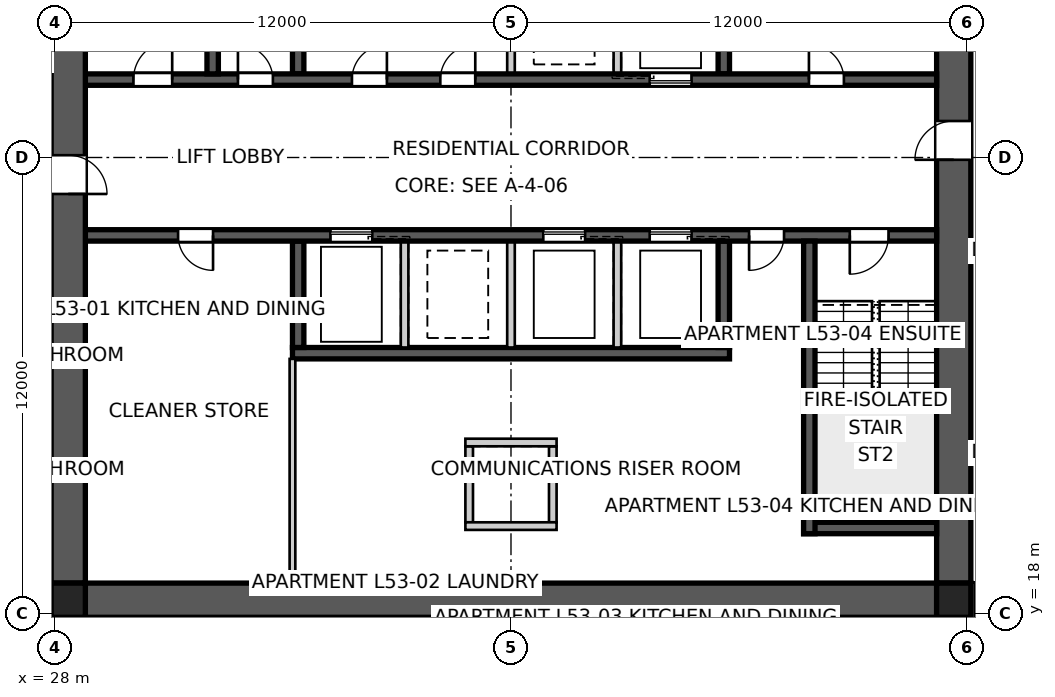
"""IFC4 building model, lengths in metres.
Left out: names, types, materials, properties, quantities, classifications, styles, units other than length and angle.
Written with IfcOpenShell. Run it as: python <this file> out.ifc"""

import sys

from ifc_helpers import new_model, si_unit, direction, frame, frame_2d, origin, origin_2d, place, context, subcontext, project, spatial, polyline, rectangle, outline, extrude, element, fill, save


model = new_model("IFC4")
c1 = context("Model", 3, precision=1e-05, world=origin(), true_north=direction((0.0, 1.0)))
c2 = subcontext(c1, "Body", "Model", "MODEL_VIEW")
j1 = project(units=[si_unit("LENGTHUNIT", "METRE"), si_unit("PLANEANGLEUNIT", "RADIAN")], contexts=[c1])
p1 = place(None, origin())
s1 = spatial("IfcSite", under=j1, at=p1, CompositionType="ELEMENT")
p2 = place(p1, origin())
s2 = spatial("IfcBuilding", under=s1, at=p2, CompositionType="ELEMENT")
p3 = place(p2, frame((0.0, 0.0, 193.0)))
s3 = spatial("IfcBuildingStorey", under=s2, at=p3, CompositionType="ELEMENT", Elevation=193.0)
p4 = place(p3, frame((51.2, 18.35, 0.0), z_axis=(0.0, 0.0, 1.0), x_axis=(-1.0, 0.0, 0.0)))
e1 = element("IfcWall", 1, at=p4, inside=s3, PredefinedType="SHEAR", context=c2, shape_type="SweptSolid", body=[
    extrude(outline(polyline([(0.0, -0.45), (22.4, -0.45), (22.4, -0.025), (22.85, -0.025), (22.85, 0.025), (22.4, 0.025), (22.4, 0.45), (0.0, 0.45), (0.0, 0.025), (-0.45, 0.025), (-0.45, -0.025), (0.0, -0.025), (0.0, -0.45)])), origin(), (0.0, 0.0, 1.0), 3.4),
])
p5 = place(p3, frame((51.65, 18.8, 0.0), z_axis=(0.0, 0.0, 1.0), x_axis=(0.0, 1.0, 0.0)))
e2 = element("IfcWall", 2, at=p5, inside=s3, PredefinedType="SHEAR", context=c2, shape_type="SweptSolid", body=[
    extrude(outline(polyline([(0.0, -0.45), (22.4, -0.45), (22.4, -0.025), (22.85, -0.025), (22.85, 0.025), (22.4, 0.025), (22.4, 0.45), (0.0, 0.45), (0.0, 0.025), (-0.45, 0.025), (-0.45, -0.025), (0.0, -0.025), (0.0, -0.45)])), origin(), (0.0, 0.0, 1.0), 3.4),
])
p6 = place(p5, frame((11.14, 0.0, 0.0)))
e3 = element("IfcOpeningElement", 3, at=p6, cuts=e2, PredefinedType="OPENING", context=c2, shape_type="SweptSolid", body=[
    extrude(rectangle(XDim=1.02, YDim=2.4, at=frame_2d((0.51, 1.2))), frame((0.0, 0.46, 0.0), z_axis=(0.0, -1.0, 0.0), x_axis=(1.0, 0.0, 0.0)), (0.0, 0.0, 1.0), 0.92),
])
p7 = place(p3, frame((28.35, 41.2, 0.0), z_axis=(0.0, 0.0, 1.0), x_axis=(0.0, -1.0, 0.0)))
e4 = element("IfcWall", 4, at=p7, inside=s3, PredefinedType="SHEAR", context=c2, shape_type="SweptSolid", body=[
    extrude(outline(polyline([(0.0, -0.45), (22.4, -0.45), (22.4, -0.025), (22.85, -0.025), (22.85, 0.025), (22.4, 0.025), (22.4, 0.45), (0.0, 0.45), (0.0, 0.025), (-0.45, 0.025), (-0.45, -0.025), (0.0, -0.025), (0.0, -0.45)])), origin(), (0.0, 0.0, 1.0), 3.4),
])
p8 = place(p7, frame((11.14, 0.0, 0.0)))
e5 = element("IfcOpeningElement", 5, at=p8, cuts=e4, PredefinedType="OPENING", context=c2, shape_type="SweptSolid", body=[
    extrude(rectangle(XDim=1.02, YDim=2.4, at=frame_2d((0.51, 1.2))), frame((0.0, 0.46, 0.0), z_axis=(0.0, -1.0, 0.0), x_axis=(1.0, 0.0, 0.0)), (0.0, 0.0, 1.0), 0.92),
])
p9 = place(p3, frame((28.8, 32.05, 0.0), z_axis=(0.0, 0.0, 1.0), x_axis=(1.0, 0.0, 0.0)))
e6 = element("IfcWall", 6, at=p9, inside=s3, PredefinedType="SHEAR", context=c2, shape_type="SweptSolid", body=[
    extrude(rectangle(XDim=22.4, YDim=0.3, at=frame_2d((11.2, 0.0))), origin(), (0.0, 0.0, 1.0), 3.4),
])
p10 = place(p9, frame((19.04, 0.0, 0.0)))
e7 = element("IfcOpeningElement", 7, at=p10, cuts=e6, PredefinedType="OPENING", context=c2, shape_type="SweptSolid", body=[
    extrude(rectangle(XDim=0.92, YDim=2.1, at=frame_2d((0.46, 1.05))), frame((0.0, 0.16, 0.0), z_axis=(0.0, -1.0, 0.0), x_axis=(1.0, 0.0, 0.0)), (0.0, 0.0, 1.0), 0.32),
])
p11 = place(p9, frame((1.265, 0.0, 0.0)))
e8 = element("IfcOpeningElement", 8, at=p11, cuts=e6, PredefinedType="OPENING", context=c2, shape_type="SweptSolid", body=[
    extrude(rectangle(XDim=1.02, YDim=2.1, at=frame_2d((0.51, 1.05))), frame((0.0, 0.16, 0.0), z_axis=(0.0, -1.0, 0.0), x_axis=(1.0, 0.0, 0.0)), (0.0, 0.0, 1.0), 0.32),
])
p12 = place(p9, frame((4.015, 0.0, 0.0)))
e9 = element("IfcOpeningElement", 9, at=p12, cuts=e6, PredefinedType="OPENING", context=c2, shape_type="SweptSolid", body=[
    extrude(rectangle(XDim=0.92, YDim=2.1, at=frame_2d((0.46, 1.05))), frame((0.0, 0.16, 0.0), z_axis=(0.0, -1.0, 0.0), x_axis=(1.0, 0.0, 0.0)), (0.0, 0.0, 1.0), 0.32),
])
p13 = place(p9, frame((7.015, 0.0, 0.0)))
e10 = element("IfcOpeningElement", 10, at=p13, cuts=e6, PredefinedType="OPENING", context=c2, shape_type="SweptSolid", body=[
    extrude(rectangle(XDim=0.92, YDim=2.1, at=frame_2d((0.46, 1.05))), frame((0.0, 0.16, 0.0), z_axis=(0.0, -1.0, 0.0), x_axis=(1.0, 0.0, 0.0)), (0.0, 0.0, 1.0), 0.32),
])
p14 = place(p9, frame((9.34, 0.0, 0.0)))
e11 = element("IfcOpeningElement", 11, at=p14, cuts=e6, PredefinedType="OPENING", context=c2, shape_type="SweptSolid", body=[
    extrude(rectangle(XDim=0.92, YDim=2.1, at=frame_2d((0.46, 1.05))), frame((0.0, 0.16, 0.0), z_axis=(0.0, -1.0, 0.0), x_axis=(1.0, 0.0, 0.0)), (0.0, 0.0, 1.0), 0.32),
])
p15 = place(p9, frame((14.85, 0.0, 0.0)))
e12 = element("IfcOpeningElement", 12, at=p15, cuts=e6, PredefinedType="OPENING", context=c2, shape_type="SweptSolid", body=[
    extrude(rectangle(XDim=1.1, YDim=2.1, at=frame_2d((0.55, 1.05))), frame((0.0, 0.16, 0.0), z_axis=(0.0, -1.0, 0.0), x_axis=(1.0, 0.0, 0.0)), (0.0, 0.0, 1.0), 0.32),
])
p16 = place(p3, frame((51.2, 27.95, 0.0), z_axis=(0.0, 0.0, 1.0), x_axis=(-1.0, 0.0, 0.0)))
e13 = element("IfcWall", 13, at=p16, inside=s3, PredefinedType="SHEAR", context=c2, shape_type="SweptSolid", body=[
    extrude(rectangle(XDim=22.4, YDim=0.3, at=frame_2d((11.2, 0.0))), origin(), (0.0, 0.0, 1.0), 3.4),
])
p17 = place(p16, frame((19.04, 0.0, 0.0)))
e14 = element("IfcOpeningElement", 14, at=p17, cuts=e13, PredefinedType="OPENING", context=c2, shape_type="SweptSolid", body=[
    extrude(rectangle(XDim=0.92, YDim=2.1, at=frame_2d((0.46, 1.05))), frame((0.0, 0.16, 0.0), z_axis=(0.0, -1.0, 0.0), x_axis=(1.0, 0.0, 0.0)), (0.0, 0.0, 1.0), 0.32),
])
p18 = place(p16, frame((1.265, 0.0, 0.0)))
e15 = element("IfcOpeningElement", 15, at=p18, cuts=e13, PredefinedType="OPENING", context=c2, shape_type="SweptSolid", body=[
    extrude(rectangle(XDim=1.02, YDim=2.1, at=frame_2d((0.51, 1.05))), frame((0.0, 0.16, 0.0), z_axis=(0.0, -1.0, 0.0), x_axis=(1.0, 0.0, 0.0)), (0.0, 0.0, 1.0), 0.32),
])
p19 = place(p16, frame((4.015, 0.0, 0.0)))
e16 = element("IfcOpeningElement", 16, at=p19, cuts=e13, PredefinedType="OPENING", context=c2, shape_type="SweptSolid", body=[
    extrude(rectangle(XDim=0.92, YDim=2.1, at=frame_2d((0.46, 1.05))), frame((0.0, 0.16, 0.0), z_axis=(0.0, -1.0, 0.0), x_axis=(1.0, 0.0, 0.0)), (0.0, 0.0, 1.0), 0.32),
])
p20 = place(p16, frame((6.45, 0.0, 0.0)))
e17 = element("IfcOpeningElement", 17, at=p20, cuts=e13, PredefinedType="OPENING", context=c2, shape_type="SweptSolid", body=[
    extrude(rectangle(XDim=1.1, YDim=2.1, at=frame_2d((0.55, 1.05))), frame((0.0, 0.16, 0.0), z_axis=(0.0, -1.0, 0.0), x_axis=(1.0, 0.0, 0.0)), (0.0, 0.0, 1.0), 0.32),
])
p21 = place(p16, frame((9.25, 0.0, 0.0)))
e18 = element("IfcOpeningElement", 18, at=p21, cuts=e13, PredefinedType="OPENING", context=c2, shape_type="SweptSolid", body=[
    extrude(rectangle(XDim=1.1, YDim=2.1, at=frame_2d((0.55, 1.05))), frame((0.0, 0.16, 0.0), z_axis=(0.0, -1.0, 0.0), x_axis=(1.0, 0.0, 0.0)), (0.0, 0.0, 1.0), 0.32),
])
p22 = place(p16, frame((14.85, 0.0, 0.0)))
e19 = element("IfcOpeningElement", 19, at=p22, cuts=e13, PredefinedType="OPENING", context=c2, shape_type="SweptSolid", body=[
    extrude(rectangle(XDim=1.1, YDim=2.1, at=frame_2d((0.55, 1.05))), frame((0.0, 0.16, 0.0), z_axis=(0.0, -1.0, 0.0), x_axis=(1.0, 0.0, 0.0)), (0.0, 0.0, 1.0), 0.32),
])
p23 = place(p3, frame((45.75, 24.85, 0.0), z_axis=(0.0, 0.0, 1.0), x_axis=(-1.0, 0.0, 0.0)))
e20 = element("IfcWall", 20, at=p23, inside=s3, PredefinedType="SHEAR", context=c2, shape_type="SweptSolid", body=[
    extrude(rectangle(XDim=11.5, YDim=0.3, at=frame_2d((5.75, 0.0))), origin(), (0.0, 0.0, 1.0), 3.4),
])
for number, where, z_axis, x_axis in (
    (21, (34.4, 32.2, 0.0), (0.0, 0.0, 1.0), (0.0, 1.0, 0.0)),
    (22, (45.6, 27.8, 0.0), (0.0, 0.0, 1.0), (0.0, -1.0, 0.0)),
):
    element("IfcWall", number, at=place(p3, frame(where, z_axis=z_axis, x_axis=x_axis)), inside=s3, PredefinedType="SHEAR", context=c2, shape_type="SweptSolid", body=[
        extrude(rectangle(XDim=2.8, YDim=0.3, at=frame_2d((1.4, 0.0))), origin(), (0.0, 0.0, 1.0), 3.4),
    ])
for number, where, z_axis, x_axis in (
    (23, (42.8, 27.8, 0.0), (0.0, 0.0, 1.0), (0.0, -1.0, 0.0)),
    (24, (40.0, 32.2, 0.0), (0.0, 0.0, 1.0), (0.0, 1.0, 0.0)),
    (25, (40.0, 27.8, 0.0), (0.0, 0.0, 1.0), (0.0, -1.0, 0.0)),
    (26, (42.8, 32.2, 0.0), (0.0, 0.0, 1.0), (0.0, 1.0, 0.0)),
    (27, (37.2, 27.8, 0.0), (0.0, 0.0, 1.0), (0.0, -1.0, 0.0)),
):
    element("IfcWall", number, at=place(p3, frame(where, z_axis=z_axis, x_axis=x_axis)), inside=s3, PredefinedType="SOLIDWALL", context=c2, shape_type="SweptSolid", body=[
        extrude(rectangle(XDim=2.8, YDim=0.2, at=frame_2d((1.4, 0.0))), origin(), (0.0, 0.0, 1.0), 3.4),
    ])
for number, where, z_axis, x_axis in (
    (28, (45.6, 32.2, 0.0), (0.0, 0.0, 1.0), (0.0, 1.0, 0.0)),
    (29, (34.4, 27.8, 0.0), (0.0, 0.0, 1.0), (0.0, -1.0, 0.0)),
):
    element("IfcWall", number, at=place(p3, frame(where, z_axis=z_axis, x_axis=x_axis)), inside=s3, PredefinedType="SHEAR", context=c2, shape_type="SweptSolid", body=[
        extrude(rectangle(XDim=2.8, YDim=0.3, at=frame_2d((1.4, 0.0))), origin(), (0.0, 0.0, 1.0), 3.4),
    ])
for number, where, z_axis, x_axis in (
    (30, (32.15, 32.2, 0.0), (0.0, 0.0, 1.0), (0.0, 1.0, 0.0)),
    (31, (47.85, 27.8, 0.0), (0.0, 0.0, 1.0), (0.0, -1.0, 0.0)),
):
    element("IfcWall", number, at=place(p3, frame(where, z_axis=z_axis, x_axis=x_axis)), inside=s3, PredefinedType="SHEAR", context=c2, shape_type="SweptSolid", body=[
        extrude(rectangle(XDim=7.7, YDim=0.3, at=frame_2d((3.85, 0.0))), origin(), (0.0, 0.0, 1.0), 3.4),
    ])
p24 = place(p3, frame((51.2, 20.25, 0.0), z_axis=(0.0, 0.0, 1.0), x_axis=(-1.0, 0.0, 0.0)))
e32 = element("IfcWall", 32, at=p24, inside=s3, PredefinedType="SHEAR", context=c2, shape_type="SweptSolid", body=[
    extrude(rectangle(XDim=3.5, YDim=0.3, at=frame_2d((1.75, 0.0))), origin(), (0.0, 0.0, 1.0), 3.4),
])
for number, where, z_axis, x_axis in (
    (33, (38.9, 22.4, 0.0), (0.0, 0.0, 1.0), (0.0, -1.0, 0.0)),
    (34, (41.1, 22.4, 0.0), (0.0, 0.0, 1.0), (0.0, -1.0, 0.0)),
):
    element("IfcWall", number, at=place(p3, frame(where, z_axis=z_axis, x_axis=x_axis)), inside=s3, PredefinedType="SOLIDWALL", context=c2, shape_type="SweptSolid", body=[
        extrude(rectangle(XDim=2.0, YDim=0.2, at=frame_2d((1.0, 0.0))), origin(), (0.0, 0.0, 1.0), 3.4),
    ])
for number, where, z_axis, x_axis in (
    (35, (38.8, 22.5, 0.0), (0.0, 0.0, 1.0), (1.0, 0.0, 0.0)),
    (36, (38.8, 20.3, 0.0), (0.0, 0.0, 1.0), (1.0, 0.0, 0.0)),
):
    element("IfcWall", number, at=place(p3, frame(where, z_axis=z_axis, x_axis=x_axis)), inside=s3, PredefinedType="SOLIDWALL", context=c2, shape_type="SweptSolid", body=[
        extrude(rectangle(XDim=2.4, YDim=0.2, at=frame_2d((1.2, 0.0))), origin(), (0.0, 0.0, 1.0), 3.4),
    ])
for number, where, z_axis, x_axis in (
    (37, (28.35, 18.35, 0.0), (0.0, 0.0, 1.0), (1.0, 0.0, 0.0)),
    (38, (51.65, 18.35, 0.0), (0.0, 0.0, 1.0), (1.0, 0.0, 0.0)),
):
    element("IfcColumn", number, at=place(p3, frame(where, z_axis=z_axis, x_axis=x_axis)), inside=s3, PredefinedType="COLUMN", context=c2, shape_type="SweptSolid", body=[
        extrude(rectangle(XDim=0.9, YDim=0.9, at=origin_2d()), origin(), (0.0, 0.0, 1.0), 3.4),
    ])
p25 = place(p3, frame((34.25, 18.8, 0.0), z_axis=(0.0, 0.0, 1.0), x_axis=(0.0, 1.0, 0.0)))
e39 = element("IfcWall", 39, at=p25, inside=s3, PredefinedType="SOLIDWALL", context=c2, shape_type="SweptSolid", body=[
    extrude(rectangle(XDim=5.9, YDim=0.15, at=frame_2d((2.95, 0.0))), origin(), (0.0, 0.0, 1.0), 3.25),
])
p26 = place(p3, frame((27.9, 17.95, 0.0), z_axis=(0.0, 0.0, 1.0), x_axis=(0.0, -1.0, 0.0)))
e40 = element("IfcWall", 40, at=p26, inside=s3, PredefinedType="PARTITIONING", context=c2, shape_type="SweptSolid", body=[
    extrude(rectangle(XDim=2.3, YDim=0.2, at=frame_2d((1.15, 0.0))), origin(), (0.0, 0.0, 1.0), 3.25),
])
p27 = place(p3, frame((52.1, 15.65, 0.0), z_axis=(0.0, 0.0, 1.0), x_axis=(0.0, 1.0, 0.0)))
e41 = element("IfcWall", 41, at=p27, inside=s3, PredefinedType="PARTITIONING", context=c2, shape_type="SweptSolid", body=[
    extrude(rectangle(XDim=3.17, YDim=0.2, at=frame_2d((1.585, 0.0))), origin(), (0.0, 0.0, 1.0), 3.25),
])
p28 = place(p10, origin())
e42 = element("IfcDoor", 42, at=p28, inside=s3, OperationType="SINGLE_SWING_LEFT", PredefinedType="DOOR", context=c2, shape_type="SweptSolid", body=[
    extrude(rectangle(XDim=0.92, YDim=2.1, at=frame_2d((0.46, 1.05))), frame((0.0, 0.025, 0.0), z_axis=(0.0, -1.0, 0.0), x_axis=(1.0, 0.0, 0.0)), (0.0, 0.0, 1.0), 0.05),
])
fill(e7, e42)
p29 = place(p17, origin())
e43 = element("IfcDoor", 43, at=p29, inside=s3, OperationType="SINGLE_SWING_LEFT", PredefinedType="DOOR", context=c2, shape_type="SweptSolid", body=[
    extrude(rectangle(XDim=0.92, YDim=2.1, at=frame_2d((0.46, 1.05))), frame((0.0, 0.025, 0.0), z_axis=(0.0, -1.0, 0.0), x_axis=(1.0, 0.0, 0.0)), (0.0, 0.0, 1.0), 0.05),
])
fill(e14, e43)
p30 = place(p18, origin())
e44 = element("IfcDoor", 44, at=p30, inside=s3, OperationType="SINGLE_SWING_RIGHT", PredefinedType="DOOR", context=c2, shape_type="SweptSolid", body=[
    extrude(rectangle(XDim=1.02, YDim=2.1, at=frame_2d((0.51, 1.05))), frame((0.0, 0.025, 0.0), z_axis=(0.0, -1.0, 0.0), x_axis=(1.0, 0.0, 0.0)), (0.0, 0.0, 1.0), 0.05),
])
fill(e15, e44)
p31 = place(p11, origin())
e45 = element("IfcDoor", 45, at=p31, inside=s3, OperationType="SINGLE_SWING_RIGHT", PredefinedType="DOOR", context=c2, shape_type="SweptSolid", body=[
    extrude(rectangle(XDim=1.02, YDim=2.1, at=frame_2d((0.51, 1.05))), frame((0.0, 0.025, 0.0), z_axis=(0.0, -1.0, 0.0), x_axis=(1.0, 0.0, 0.0)), (0.0, 0.0, 1.0), 0.05),
])
fill(e8, e45)
p32 = place(p12, origin())
e46 = element("IfcDoor", 46, at=p32, inside=s3, OperationType="SINGLE_SWING_LEFT", PredefinedType="DOOR", context=c2, shape_type="SweptSolid", body=[
    extrude(rectangle(XDim=0.92, YDim=2.1, at=frame_2d((0.46, 1.05))), frame((0.0, 0.025, 0.0), z_axis=(0.0, -1.0, 0.0), x_axis=(1.0, 0.0, 0.0)), (0.0, 0.0, 1.0), 0.05),
])
fill(e9, e46)
p33 = place(p19, origin())
e47 = element("IfcDoor", 47, at=p33, inside=s3, OperationType="SINGLE_SWING_RIGHT", PredefinedType="DOOR", context=c2, shape_type="SweptSolid", body=[
    extrude(rectangle(XDim=0.92, YDim=2.1, at=frame_2d((0.46, 1.05))), frame((0.0, 0.025, 0.0), z_axis=(0.0, -1.0, 0.0), x_axis=(1.0, 0.0, 0.0)), (0.0, 0.0, 1.0), 0.05),
])
fill(e16, e47)
p34 = place(p13, origin())
e48 = element("IfcDoor", 48, at=p34, inside=s3, OperationType="SINGLE_SWING_RIGHT", PredefinedType="DOOR", context=c2, shape_type="SweptSolid", body=[
    extrude(rectangle(XDim=0.92, YDim=2.1, at=frame_2d((0.46, 1.05))), frame((0.0, 0.025, 0.0), z_axis=(0.0, -1.0, 0.0), x_axis=(1.0, 0.0, 0.0)), (0.0, 0.0, 1.0), 0.05),
])
fill(e10, e48)
p35 = place(p14, origin())
e49 = element("IfcDoor", 49, at=p35, inside=s3, OperationType="SINGLE_SWING_RIGHT", PredefinedType="DOOR", context=c2, shape_type="SweptSolid", body=[
    extrude(rectangle(XDim=0.92, YDim=2.1, at=frame_2d((0.46, 1.05))), frame((0.0, 0.025, 0.0), z_axis=(0.0, -1.0, 0.0), x_axis=(1.0, 0.0, 0.0)), (0.0, 0.0, 1.0), 0.05),
])
fill(e11, e49)
p36 = place(p6, origin())
e50 = element("IfcDoor", 50, at=p36, inside=s3, OperationType="SINGLE_SWING_LEFT", PredefinedType="DOOR", context=c2, shape_type="SweptSolid", body=[
    extrude(rectangle(XDim=1.02, YDim=2.4, at=frame_2d((0.51, 1.2))), frame((0.0, 0.025, 0.0), z_axis=(0.0, -1.0, 0.0), x_axis=(1.0, 0.0, 0.0)), (0.0, 0.0, 1.0), 0.05),
])
fill(e3, e50)
p37 = place(p8, origin())
e51 = element("IfcDoor", 51, at=p37, inside=s3, OperationType="SINGLE_SWING_RIGHT", PredefinedType="DOOR", context=c2, shape_type="SweptSolid", body=[
    extrude(rectangle(XDim=1.02, YDim=2.4, at=frame_2d((0.51, 1.2))), frame((0.0, 0.025, 0.0), z_axis=(0.0, -1.0, 0.0), x_axis=(1.0, 0.0, 0.0)), (0.0, 0.0, 1.0), 0.05),
])
fill(e5, e51)
p38 = place(p20, origin())
e52 = element("IfcDoor", 52, at=p38, inside=s3, OperationType="SLIDING_TO_LEFT", PredefinedType="DOOR", context=c2, shape_type="SweptSolid", body=[
    extrude(rectangle(XDim=1.1, YDim=2.1, at=frame_2d((0.55, 1.05))), frame((0.0, 0.025, 0.0), z_axis=(0.0, -1.0, 0.0), x_axis=(1.0, 0.0, 0.0)), (0.0, 0.0, 1.0), 0.05),
])
fill(e17, e52)
p39 = place(p21, origin())
e53 = element("IfcDoor", 53, at=p39, inside=s3, OperationType="SLIDING_TO_LEFT", PredefinedType="DOOR", context=c2, shape_type="SweptSolid", body=[
    extrude(rectangle(XDim=1.1, YDim=2.1, at=frame_2d((0.55, 1.05))), frame((0.0, 0.025, 0.0), z_axis=(0.0, -1.0, 0.0), x_axis=(1.0, 0.0, 0.0)), (0.0, 0.0, 1.0), 0.05),
])
fill(e18, e53)
p40 = place(p15, origin())
e54 = element("IfcDoor", 54, at=p40, inside=s3, OperationType="SLIDING_TO_LEFT", PredefinedType="DOOR", context=c2, shape_type="SweptSolid", body=[
    extrude(rectangle(XDim=1.1, YDim=2.1, at=frame_2d((0.55, 1.05))), frame((0.0, 0.025, 0.0), z_axis=(0.0, -1.0, 0.0), x_axis=(1.0, 0.0, 0.0)), (0.0, 0.0, 1.0), 0.05),
])
fill(e12, e54)
p41 = place(p22, origin())
e55 = element("IfcDoor", 55, at=p41, inside=s3, OperationType="SLIDING_TO_LEFT", PredefinedType="DOOR", context=c2, shape_type="SweptSolid", body=[
    extrude(rectangle(XDim=1.1, YDim=2.1, at=frame_2d((0.55, 1.05))), frame((0.0, 0.025, 0.0), z_axis=(0.0, -1.0, 0.0), x_axis=(1.0, 0.0, 0.0)), (0.0, 0.0, 1.0), 0.05),
])
fill(e19, e55)
save(model, sys.argv[1])
